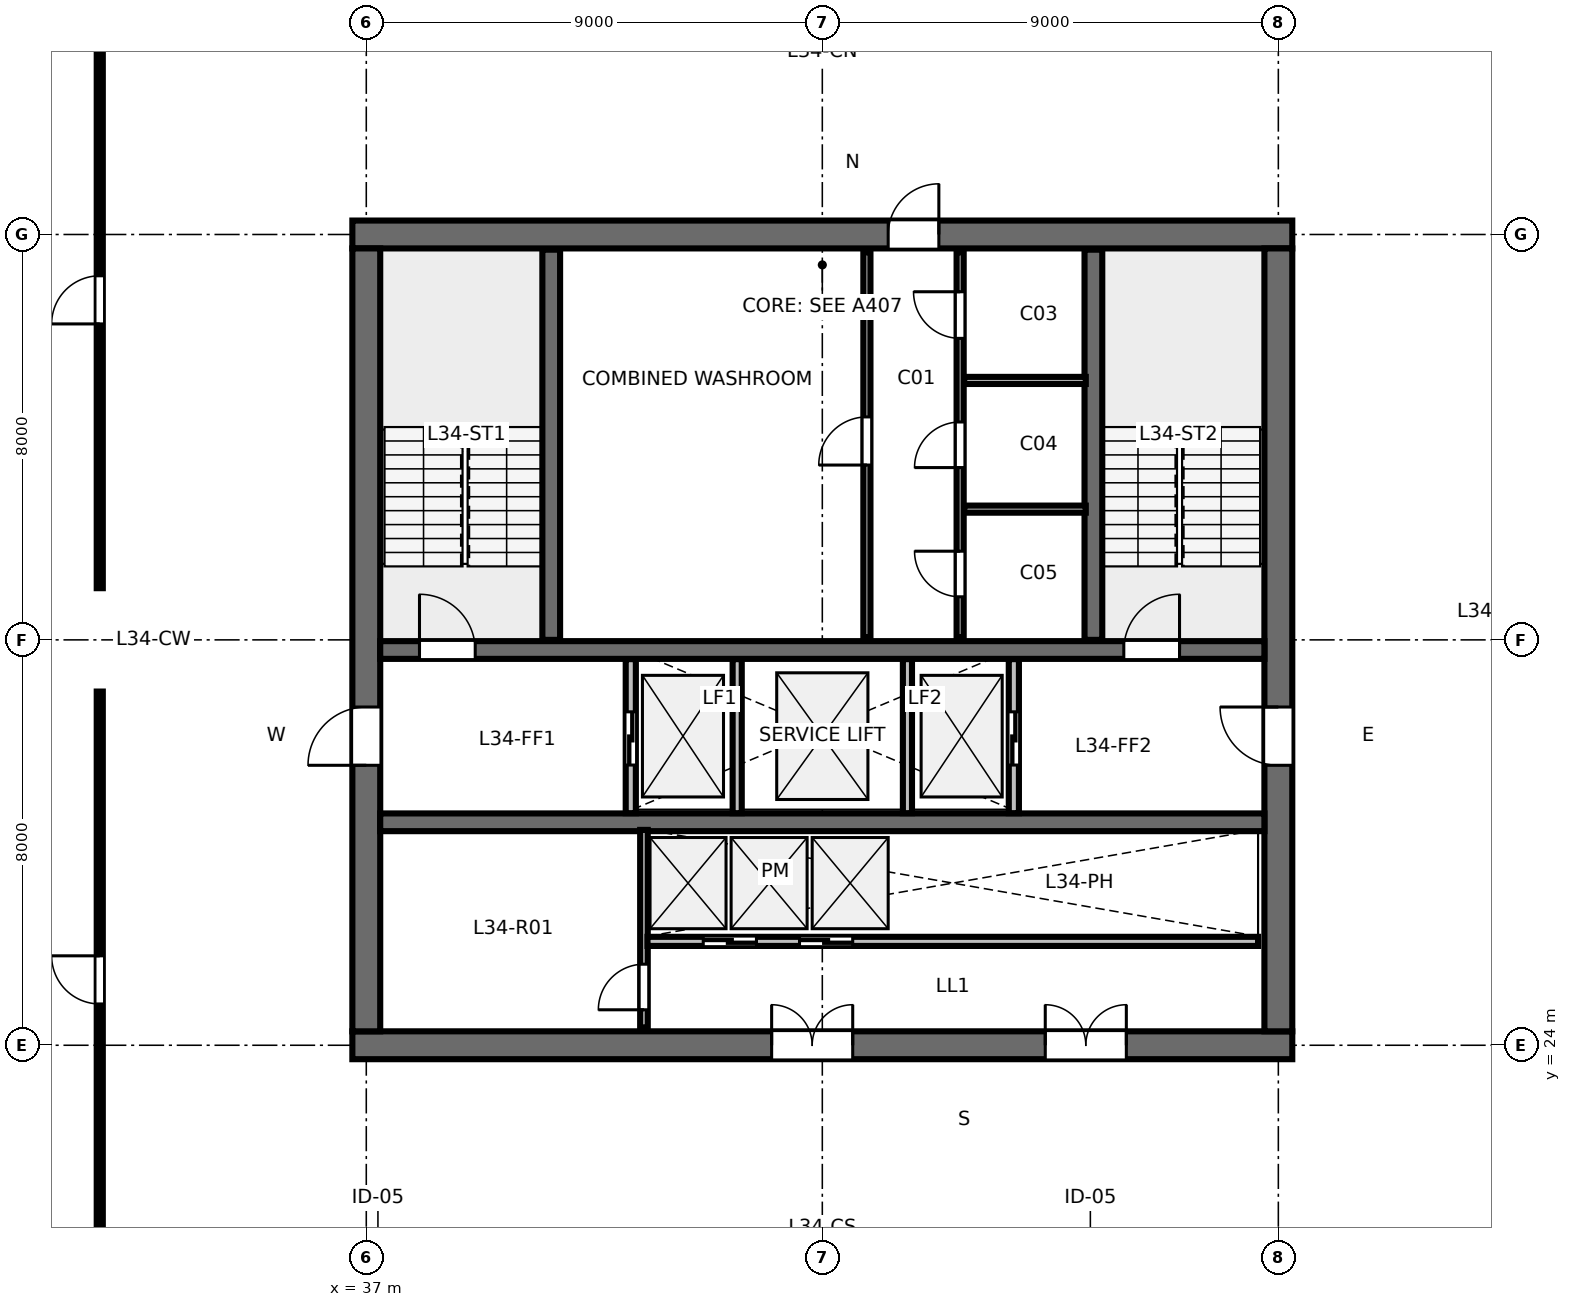
"""IFC4 building model, lengths in metres.
Left out: names, types, materials, properties, quantities, classifications, styles, units other than length and angle.
Written with IfcOpenShell. Run it as: python <this file> out.ifc"""

import sys

from ifc_helpers import new_model, si_unit, direction, frame, frame_2d, origin, place, context, subcontext, project, spatial, rectangle, extrude, element, fill, save


model = new_model("IFC4")
c1 = context("Model", 3, precision=1e-05, world=origin(), true_north=direction((0.0, 1.0)))
c2 = subcontext(c1, "Body", "Model", "MODEL_VIEW")
j1 = project(units=[si_unit("LENGTHUNIT", "METRE"), si_unit("PLANEANGLEUNIT", "RADIAN")], contexts=[c1])
p1 = place(None, origin())
s1 = spatial("IfcSite", under=j1, at=p1, CompositionType="ELEMENT")
p2 = place(p1, origin())
s2 = spatial("IfcBuilding", under=s1, at=p2, CompositionType="ELEMENT")
p3 = place(p2, frame((0.0, 0.0, 131.2)))
s3 = spatial("IfcBuildingStorey", under=s2, at=p3, CompositionType="ELEMENT", Elevation=131.2)
p4 = place(p3, frame((36.725, 24.0, 0.0), z_axis=(0.0, 0.0, 1.0), x_axis=(1.0, 0.0, 0.0)))
e1 = element("IfcWall", 1, at=p4, inside=s3, PredefinedType="SHEAR", context=c2, shape_type="SweptSolid", body=[
    extrude(rectangle(XDim=18.55, YDim=0.55, at=frame_2d((9.275, 0.0))), origin(), (0.0, 0.0, 1.0), 3.36),
])
p5 = place(p4, frame((8.275, 0.0, 0.0)))
e2 = element("IfcOpeningElement", 2, at=p5, cuts=e1, PredefinedType="OPENING", context=c2, shape_type="SweptSolid", body=[
    extrude(rectangle(XDim=1.6, YDim=2.15, at=frame_2d((0.8, 1.075))), frame((0.0, 0.285, 0.0), z_axis=(0.0, -1.0, 0.0), x_axis=(1.0, 0.0, 0.0)), (0.0, 0.0, 1.0), 0.57),
])
p6 = place(p4, frame((13.675, 0.0, 0.0)))
e3 = element("IfcOpeningElement", 3, at=p6, cuts=e1, PredefinedType="OPENING", context=c2, shape_type="SweptSolid", body=[
    extrude(rectangle(XDim=1.6, YDim=2.15, at=frame_2d((0.8, 1.075))), frame((0.0, 0.285, 0.0), z_axis=(0.0, -1.0, 0.0), x_axis=(1.0, 0.0, 0.0)), (0.0, 0.0, 1.0), 0.57),
])
p7 = place(p3, frame((36.725, 40.0, 0.0), z_axis=(0.0, 0.0, 1.0), x_axis=(1.0, 0.0, 0.0)))
e4 = element("IfcWall", 4, at=p7, inside=s3, PredefinedType="SHEAR", context=c2, shape_type="SweptSolid", body=[
    extrude(rectangle(XDim=18.55, YDim=0.55, at=frame_2d((9.275, 0.0))), origin(), (0.0, 0.0, 1.0), 3.36),
])
p8 = place(p7, frame((10.575, 0.0, 0.0)))
e5 = element("IfcOpeningElement", 5, at=p8, cuts=e4, PredefinedType="OPENING", context=c2, shape_type="SweptSolid", body=[
    extrude(rectangle(XDim=1.0, YDim=2.15, at=frame_2d((0.5, 1.075))), frame((0.0, 0.285, 0.0), z_axis=(0.0, -1.0, 0.0), x_axis=(1.0, 0.0, 0.0)), (0.0, 0.0, 1.0), 0.57),
])
p9 = place(p3, frame((37.0, 24.275, 0.0), z_axis=(0.0, 0.0, 1.0), x_axis=(0.0, 1.0, 0.0)))
e6 = element("IfcWall", 6, at=p9, inside=s3, PredefinedType="SHEAR", context=c2, shape_type="SweptSolid", body=[
    extrude(rectangle(XDim=15.45, YDim=0.55, at=frame_2d((7.725, 0.0))), origin(), (0.0, 0.0, 1.0), 3.36),
])
p10 = place(p9, frame((5.25, 0.0, 0.0)))
e7 = element("IfcOpeningElement", 7, at=p10, cuts=e6, PredefinedType="OPENING", context=c2, shape_type="SweptSolid", body=[
    extrude(rectangle(XDim=1.15, YDim=2.15, at=frame_2d((0.575, 1.075))), frame((0.0, 0.285, 0.0), z_axis=(0.0, -1.0, 0.0), x_axis=(1.0, 0.0, 0.0)), (0.0, 0.0, 1.0), 0.57),
])
p11 = place(p3, frame((55.0, 24.275, 0.0), z_axis=(0.0, 0.0, 1.0), x_axis=(0.0, 1.0, 0.0)))
e8 = element("IfcWall", 8, at=p11, inside=s3, PredefinedType="SHEAR", context=c2, shape_type="SweptSolid", body=[
    extrude(rectangle(XDim=15.45, YDim=0.55, at=frame_2d((7.725, 0.0))), origin(), (0.0, 0.0, 1.0), 3.36),
])
p12 = place(p11, frame((5.25, 0.0, 0.0)))
e9 = element("IfcOpeningElement", 9, at=p12, cuts=e8, PredefinedType="OPENING", context=c2, shape_type="SweptSolid", body=[
    extrude(rectangle(XDim=1.15, YDim=2.15, at=frame_2d((0.575, 1.075))), frame((0.0, 0.285, 0.0), z_axis=(0.0, -1.0, 0.0), x_axis=(1.0, 0.0, 0.0)), (0.0, 0.0, 1.0), 0.57),
])
p13 = place(p3, frame((37.275, 31.8, 0.0), z_axis=(0.0, 0.0, 1.0), x_axis=(1.0, 0.0, 0.0)))
e10 = element("IfcWall", 10, at=p13, inside=s3, PredefinedType="SHEAR", context=c2, shape_type="SweptSolid", body=[
    extrude(rectangle(XDim=17.45, YDim=0.35, at=frame_2d((8.725, 0.0))), origin(), (0.0, 0.0, 1.0), 3.36),
])
p14 = place(p13, frame((0.775, 0.0, 0.0)))
e11 = element("IfcOpeningElement", 11, at=p14, cuts=e10, PredefinedType="OPENING", context=c2, shape_type="SweptSolid", body=[
    extrude(rectangle(XDim=1.1, YDim=2.15, at=frame_2d((0.55, 1.075))), frame((0.0, 0.185, 0.0), z_axis=(0.0, -1.0, 0.0), x_axis=(1.0, 0.0, 0.0)), (0.0, 0.0, 1.0), 0.37),
])
p15 = place(p13, frame((14.675, 0.0, 0.0)))
e12 = element("IfcOpeningElement", 12, at=p15, cuts=e10, PredefinedType="OPENING", context=c2, shape_type="SweptSolid", body=[
    extrude(rectangle(XDim=1.1, YDim=2.15, at=frame_2d((0.55, 1.075))), frame((0.0, 0.185, 0.0), z_axis=(0.0, -1.0, 0.0), x_axis=(1.0, 0.0, 0.0)), (0.0, 0.0, 1.0), 0.37),
])
p16 = place(p3, frame((37.275, 28.4, 0.0), z_axis=(0.0, 0.0, 1.0), x_axis=(1.0, 0.0, 0.0)))
e13 = element("IfcWall", 13, at=p16, inside=s3, PredefinedType="SHEAR", context=c2, shape_type="SweptSolid", body=[
    extrude(rectangle(XDim=17.45, YDim=0.35, at=frame_2d((8.725, 0.0))), origin(), (0.0, 0.0, 1.0), 3.36),
])
for number, where, z_axis, x_axis in (
    (14, (40.65, 32.0, 0.0), (0.0, 0.0, 1.0), (0.0, 1.0, 0.0)),
    (15, (51.35, 32.0, 0.0), (0.0, 0.0, 1.0), (0.0, 1.0, 0.0)),
):
    element("IfcWall", number, at=place(p3, frame(where, z_axis=z_axis, x_axis=x_axis)), inside=s3, PredefinedType="SHEAR", context=c2, shape_type="SweptSolid", body=[
        extrude(rectangle(XDim=7.7, YDim=0.35, at=frame_2d((3.85, 0.0))), origin(), (0.0, 0.0, 1.0), 3.6),
    ])
p17 = place(p3, frame((46.88, 32.05, 0.0), z_axis=(0.0, 0.0, 1.0), x_axis=(0.0, 1.0, 0.0)))
e16 = element("IfcWall", 16, at=p17, inside=s3, PredefinedType="PARTITIONING", context=c2, shape_type="SweptSolid", body=[
    extrude(rectangle(XDim=7.6, YDim=0.14, at=frame_2d((3.8, 0.0))), origin(), (0.0, 0.0, 1.0), 3.36),
])
p18 = place(p17, frame((3.4, 0.0, 0.0)))
e17 = element("IfcOpeningElement", 17, at=p18, cuts=e16, PredefinedType="OPENING", context=c2, shape_type="SweptSolid", body=[
    extrude(rectangle(XDim=0.95, YDim=2.15, at=frame_2d((0.475, 1.075))), frame((0.0, 0.08, 0.0), z_axis=(0.0, -1.0, 0.0), x_axis=(1.0, 0.0, 0.0)), (0.0, 0.0, 1.0), 0.16),
])
p19 = place(p3, frame((48.72, 32.05, 0.0), z_axis=(0.0, 0.0, 1.0), x_axis=(0.0, 1.0, 0.0)))
e18 = element("IfcWall", 18, at=p19, inside=s3, PredefinedType="PARTITIONING", context=c2, shape_type="SweptSolid", body=[
    extrude(rectangle(XDim=7.6, YDim=0.14, at=frame_2d((3.8, 0.0))), origin(), (0.0, 0.0, 1.0), 3.36),
])
p20 = place(p19, frame((0.8, 0.0, 0.0)))
e19 = element("IfcOpeningElement", 19, at=p20, cuts=e18, PredefinedType="OPENING", context=c2, shape_type="SweptSolid", body=[
    extrude(rectangle(XDim=0.9, YDim=2.15, at=frame_2d((0.45, 1.075))), frame((0.0, 0.08, 0.0), z_axis=(0.0, -1.0, 0.0), x_axis=(1.0, 0.0, 0.0)), (0.0, 0.0, 1.0), 0.16),
])
p21 = place(p19, frame((3.35, 0.0, 0.0)))
e20 = element("IfcOpeningElement", 20, at=p21, cuts=e18, PredefinedType="OPENING", context=c2, shape_type="SweptSolid", body=[
    extrude(rectangle(XDim=0.9, YDim=2.15, at=frame_2d((0.45, 1.075))), frame((0.0, 0.08, 0.0), z_axis=(0.0, -1.0, 0.0), x_axis=(1.0, 0.0, 0.0)), (0.0, 0.0, 1.0), 0.16),
])
p22 = place(p19, frame((5.9, 0.0, 0.0)))
e21 = element("IfcOpeningElement", 21, at=p22, cuts=e18, PredefinedType="OPENING", context=c2, shape_type="SweptSolid", body=[
    extrude(rectangle(XDim=0.92, YDim=2.15, at=frame_2d((0.46, 1.075))), frame((0.0, 0.08, 0.0), z_axis=(0.0, -1.0, 0.0), x_axis=(1.0, 0.0, 0.0)), (0.0, 0.0, 1.0), 0.16),
])
for number, where, z_axis, x_axis in (
    (22, (48.8, 34.58, 0.0), (0.0, 0.0, 1.0), (1.0, 0.0, 0.0)),
    (23, (48.8, 37.12, 0.0), (0.0, 0.0, 1.0), (1.0, 0.0, 0.0)),
):
    element("IfcWall", number, at=place(p3, frame(where, z_axis=z_axis, x_axis=x_axis)), inside=s3, PredefinedType="PARTITIONING", context=c2, shape_type="SweptSolid", body=[
        extrude(rectangle(XDim=2.4, YDim=0.14, at=frame_2d((1.2, 0.0))), origin(), (0.0, 0.0, 1.0), 3.36),
    ])
p23 = place(p3, frame((42.22, 28.58, 0.0), z_axis=(0.0, 0.0, 1.0), x_axis=(0.0, 1.0, 0.0)))
e24 = element("IfcWall", 24, at=p23, inside=s3, PredefinedType="PARTITIONING", context=c2, shape_type="SweptSolid", body=[
    extrude(rectangle(XDim=3.04, YDim=0.2, at=frame_2d((1.52, 0.0))), origin(), (0.0, 0.0, 1.0), 3.36),
])
p24 = place(p23, frame((0.95, 0.0, 0.0)))
e25 = element("IfcOpeningElement", 25, at=p24, cuts=e24, PredefinedType="OPENING", context=c2, shape_type="SweptSolid", body=[
    extrude(rectangle(XDim=1.05, YDim=2.15, at=frame_2d((0.525, 1.075))), frame((0.0, 0.11, 0.0), z_axis=(0.0, -1.0, 0.0), x_axis=(1.0, 0.0, 0.0)), (0.0, 0.0, 1.0), 0.22),
])
p25 = place(p3, frame((49.78, 28.58, 0.0), z_axis=(0.0, 0.0, 1.0), x_axis=(0.0, 1.0, 0.0)))
e26 = element("IfcWall", 26, at=p25, inside=s3, PredefinedType="PARTITIONING", context=c2, shape_type="SweptSolid", body=[
    extrude(rectangle(XDim=3.04, YDim=0.2, at=frame_2d((1.52, 0.0))), origin(), (0.0, 0.0, 1.0), 3.36),
])
p26 = place(p25, frame((0.95, 0.0, 0.0)))
e27 = element("IfcOpeningElement", 27, at=p26, cuts=e26, PredefinedType="OPENING", context=c2, shape_type="SweptSolid", body=[
    extrude(rectangle(XDim=1.05, YDim=2.15, at=frame_2d((0.525, 1.075))), frame((0.0, 0.11, 0.0), z_axis=(0.0, -1.0, 0.0), x_axis=(1.0, 0.0, 0.0)), (0.0, 0.0, 1.0), 0.22),
])
for number, where, z_axis, x_axis in (
    (28, (44.32, 28.58, 0.0), (0.0, 0.0, 1.0), (0.0, 1.0, 0.0)),
    (29, (47.68, 28.58, 0.0), (0.0, 0.0, 1.0), (0.0, 1.0, 0.0)),
):
    element("IfcWall", number, at=place(p3, frame(where, z_axis=z_axis, x_axis=x_axis)), inside=s3, PredefinedType="PARTITIONING", context=c2, shape_type="SweptSolid", body=[
        extrude(rectangle(XDim=3.04, YDim=0.18, at=frame_2d((1.52, 0.0))), origin(), (0.0, 0.0, 1.0), 3.36),
    ])
p27 = place(p3, frame((42.48, 24.35, 0.0), z_axis=(0.0, 0.0, 1.0), x_axis=(0.0, 1.0, 0.0)))
e30 = element("IfcWall", 30, at=p27, inside=s3, PredefinedType="PARTITIONING", context=c2, shape_type="SweptSolid", body=[
    extrude(rectangle(XDim=3.9, YDim=0.15, at=frame_2d((1.95, 0.0))), origin(), (0.0, 0.0, 1.0), 3.36),
])
p28 = place(p27, frame((0.35, 0.0, 0.0)))
e31 = element("IfcOpeningElement", 31, at=p28, cuts=e30, PredefinedType="OPENING", context=c2, shape_type="SweptSolid", body=[
    extrude(rectangle(XDim=0.9, YDim=2.15, at=frame_2d((0.45, 1.075))), frame((0.0, 0.085, 0.0), z_axis=(0.0, -1.0, 0.0), x_axis=(1.0, 0.0, 0.0)), (0.0, 0.0, 1.0), 0.17),
])
p29 = place(p3, frame((42.55, 26.05, 0.0), z_axis=(0.0, 0.0, 1.0), x_axis=(1.0, 0.0, 0.0)))
e32 = element("IfcWall", 32, at=p29, inside=s3, PredefinedType="PARTITIONING", context=c2, shape_type="SweptSolid", body=[
    extrude(rectangle(XDim=12.05, YDim=0.18, at=frame_2d((6.025, 0.0))), origin(), (0.0, 0.0, 1.0), 3.36),
])
p30 = place(p29, frame((1.1, 0.0, 0.0)))
e33 = element("IfcOpeningElement", 33, at=p30, cuts=e32, PredefinedType="OPENING", context=c2, shape_type="SweptSolid", body=[
    extrude(rectangle(XDim=1.05, YDim=2.15, at=frame_2d((0.525, 1.075))), frame((0.0, 0.1, 0.0), z_axis=(0.0, -1.0, 0.0), x_axis=(1.0, 0.0, 0.0)), (0.0, 0.0, 1.0), 0.2),
])
p31 = place(p29, frame((3.0, 0.0, 0.0)))
e34 = element("IfcOpeningElement", 34, at=p31, cuts=e32, PredefinedType="OPENING", context=c2, shape_type="SweptSolid", body=[
    extrude(rectangle(XDim=1.05, YDim=2.15, at=frame_2d((0.525, 1.075))), frame((0.0, 0.1, 0.0), z_axis=(0.0, -1.0, 0.0), x_axis=(1.0, 0.0, 0.0)), (0.0, 0.0, 1.0), 0.2),
])
p32 = place(p3, frame((31.74, 19.4, 0.0), z_axis=(0.0, 0.0, 1.0), x_axis=(0.0, 1.0, 0.0)))
e35 = element("IfcWall", 35, at=p32, inside=s3, PredefinedType="PARTITIONING", context=c2, shape_type="SweptSolid", body=[
    extrude(rectangle(XDim=11.58, YDim=0.12, at=frame_2d((5.79, 0.0))), origin(), (0.0, 0.0, 1.0), 2.64),
])
p33 = place(p32, frame((5.415, 0.0, 0.0)))
e36 = element("IfcOpeningElement", 36, at=p33, cuts=e35, PredefinedType="OPENING", context=c2, shape_type="SweptSolid", body=[
    extrude(rectangle(XDim=0.95, YDim=2.15, at=frame_2d((0.475, 1.075))), frame((0.0, 0.07, 0.0), z_axis=(0.0, -1.0, 0.0), x_axis=(1.0, 0.0, 0.0)), (0.0, 0.0, 1.0), 0.14),
])
p34 = place(p3, frame((31.74, 33.02, 0.0), z_axis=(0.0, 0.0, 1.0), x_axis=(0.0, 1.0, 0.0)))
e37 = element("IfcWall", 37, at=p34, inside=s3, PredefinedType="PARTITIONING", context=c2, shape_type="SweptSolid", body=[
    extrude(rectangle(XDim=11.58, YDim=0.12, at=frame_2d((5.79, 0.0))), origin(), (0.0, 0.0, 1.0), 2.64),
])
p35 = place(p34, frame((5.215, 0.0, 0.0)))
e38 = element("IfcOpeningElement", 38, at=p35, cuts=e37, PredefinedType="OPENING", context=c2, shape_type="SweptSolid", body=[
    extrude(rectangle(XDim=0.95, YDim=2.15, at=frame_2d((0.475, 1.075))), frame((0.0, 0.07, 0.0), z_axis=(0.0, -1.0, 0.0), x_axis=(1.0, 0.0, 0.0)), (0.0, 0.0, 1.0), 0.14),
])
p36 = place(p14, origin())
e39 = element("IfcDoor", 39, at=p36, inside=s3, OperationType="SINGLE_SWING_LEFT", PredefinedType="DOOR", context=c2, shape_type="SweptSolid", body=[
    extrude(rectangle(XDim=1.1, YDim=2.15, at=frame_2d((0.55, 1.075))), frame((0.0, 0.025, 0.0), z_axis=(0.0, -1.0, 0.0), x_axis=(1.0, 0.0, 0.0)), (0.0, 0.0, 1.0), 0.05),
])
fill(e11, e39)
p37 = place(p15, origin())
e40 = element("IfcDoor", 40, at=p37, inside=s3, OperationType="SINGLE_SWING_RIGHT", PredefinedType="DOOR", context=c2, shape_type="SweptSolid", body=[
    extrude(rectangle(XDim=1.1, YDim=2.15, at=frame_2d((0.55, 1.075))), frame((0.0, 0.025, 0.0), z_axis=(0.0, -1.0, 0.0), x_axis=(1.0, 0.0, 0.0)), (0.0, 0.0, 1.0), 0.05),
])
fill(e12, e40)
p38 = place(p8, origin())
e41 = element("IfcDoor", 41, at=p38, inside=s3, OperationType="SINGLE_SWING_RIGHT", PredefinedType="DOOR", context=c2, shape_type="SweptSolid", body=[
    extrude(rectangle(XDim=1.0, YDim=2.15, at=frame_2d((0.5, 1.075))), frame((0.0, 0.025, 0.0), z_axis=(0.0, -1.0, 0.0), x_axis=(1.0, 0.0, 0.0)), (0.0, 0.0, 1.0), 0.05),
])
fill(e5, e41)
p39 = place(p10, origin())
e42 = element("IfcDoor", 42, at=p39, inside=s3, OperationType="SINGLE_SWING_LEFT", PredefinedType="DOOR", context=c2, shape_type="SweptSolid", body=[
    extrude(rectangle(XDim=1.15, YDim=2.15, at=frame_2d((0.575, 1.075))), frame((0.0, 0.025, 0.0), z_axis=(0.0, -1.0, 0.0), x_axis=(1.0, 0.0, 0.0)), (0.0, 0.0, 1.0), 0.05),
])
fill(e7, e42)
p40 = place(p12, origin())
e43 = element("IfcDoor", 43, at=p40, inside=s3, OperationType="SINGLE_SWING_RIGHT", PredefinedType="DOOR", context=c2, shape_type="SweptSolid", body=[
    extrude(rectangle(XDim=1.15, YDim=2.15, at=frame_2d((0.575, 1.075))), frame((0.0, 0.025, 0.0), z_axis=(0.0, -1.0, 0.0), x_axis=(1.0, 0.0, 0.0)), (0.0, 0.0, 1.0), 0.05),
])
fill(e9, e43)
p41 = place(p5, origin())
e44 = element("IfcDoor", 44, at=p41, inside=s3, OperationType="DOUBLE_DOOR_SINGLE_SWING", PredefinedType="DOOR", context=c2, shape_type="SweptSolid", body=[
    extrude(rectangle(XDim=1.6, YDim=2.15, at=frame_2d((0.8, 1.075))), frame((0.0, 0.025, 0.0), z_axis=(0.0, -1.0, 0.0), x_axis=(1.0, 0.0, 0.0)), (0.0, 0.0, 1.0), 0.05),
])
fill(e2, e44)
p42 = place(p6, origin())
e45 = element("IfcDoor", 45, at=p42, inside=s3, OperationType="DOUBLE_DOOR_SINGLE_SWING", PredefinedType="DOOR", context=c2, shape_type="SweptSolid", body=[
    extrude(rectangle(XDim=1.6, YDim=2.15, at=frame_2d((0.8, 1.075))), frame((0.0, 0.025, 0.0), z_axis=(0.0, -1.0, 0.0), x_axis=(1.0, 0.0, 0.0)), (0.0, 0.0, 1.0), 0.05),
])
fill(e3, e45)
p43 = place(p18, origin())
e46 = element("IfcDoor", 46, at=p43, inside=s3, OperationType="SINGLE_SWING_LEFT", PredefinedType="DOOR", context=c2, shape_type="SweptSolid", body=[
    extrude(rectangle(XDim=0.95, YDim=2.15, at=frame_2d((0.475, 1.075))), frame((0.0, 0.025, 0.0), z_axis=(0.0, -1.0, 0.0), x_axis=(1.0, 0.0, 0.0)), (0.0, 0.0, 1.0), 0.05),
])
fill(e17, e46)
p44 = place(p20, origin())
e47 = element("IfcDoor", 47, at=p44, inside=s3, OperationType="SINGLE_SWING_RIGHT", PredefinedType="DOOR", context=c2, shape_type="SweptSolid", body=[
    extrude(rectangle(XDim=0.9, YDim=2.15, at=frame_2d((0.45, 1.075))), frame((0.0, 0.025, 0.0), z_axis=(0.0, -1.0, 0.0), x_axis=(1.0, 0.0, 0.0)), (0.0, 0.0, 1.0), 0.05),
])
fill(e19, e47)
p45 = place(p21, origin())
e48 = element("IfcDoor", 48, at=p45, inside=s3, OperationType="SINGLE_SWING_LEFT", PredefinedType="DOOR", context=c2, shape_type="SweptSolid", body=[
    extrude(rectangle(XDim=0.9, YDim=2.15, at=frame_2d((0.45, 1.075))), frame((0.0, 0.025, 0.0), z_axis=(0.0, -1.0, 0.0), x_axis=(1.0, 0.0, 0.0)), (0.0, 0.0, 1.0), 0.05),
])
fill(e20, e48)
p46 = place(p22, origin())
e49 = element("IfcDoor", 49, at=p46, inside=s3, OperationType="SINGLE_SWING_RIGHT", PredefinedType="DOOR", context=c2, shape_type="SweptSolid", body=[
    extrude(rectangle(XDim=0.92, YDim=2.15, at=frame_2d((0.46, 1.075))), frame((0.0, 0.025, 0.0), z_axis=(0.0, -1.0, 0.0), x_axis=(1.0, 0.0, 0.0)), (0.0, 0.0, 1.0), 0.05),
])
fill(e21, e49)
p47 = place(p24, origin())
e50 = element("IfcDoor", 50, at=p47, inside=s3, OperationType="SLIDING_TO_LEFT", PredefinedType="DOOR", context=c2, shape_type="SweptSolid", body=[
    extrude(rectangle(XDim=1.05, YDim=2.15, at=frame_2d((0.525, 1.075))), frame((0.0, 0.025, 0.0), z_axis=(0.0, -1.0, 0.0), x_axis=(1.0, 0.0, 0.0)), (0.0, 0.0, 1.0), 0.05),
])
fill(e25, e50)
p48 = place(p26, origin())
e51 = element("IfcDoor", 51, at=p48, inside=s3, OperationType="SLIDING_TO_RIGHT", PredefinedType="DOOR", context=c2, shape_type="SweptSolid", body=[
    extrude(rectangle(XDim=1.05, YDim=2.15, at=frame_2d((0.525, 1.075))), frame((0.0, 0.025, 0.0), z_axis=(0.0, -1.0, 0.0), x_axis=(1.0, 0.0, 0.0)), (0.0, 0.0, 1.0), 0.05),
])
fill(e27, e51)
p49 = place(p28, origin())
e52 = element("IfcDoor", 52, at=p49, inside=s3, OperationType="SINGLE_SWING_LEFT", PredefinedType="DOOR", context=c2, shape_type="SweptSolid", body=[
    extrude(rectangle(XDim=0.9, YDim=2.15, at=frame_2d((0.45, 1.075))), frame((0.0, 0.025, 0.0), z_axis=(0.0, -1.0, 0.0), x_axis=(1.0, 0.0, 0.0)), (0.0, 0.0, 1.0), 0.05),
])
fill(e31, e52)
p50 = place(p30, origin())
e53 = element("IfcDoor", 53, at=p50, inside=s3, OperationType="SLIDING_TO_LEFT", PredefinedType="DOOR", context=c2, shape_type="SweptSolid", body=[
    extrude(rectangle(XDim=1.05, YDim=2.15, at=frame_2d((0.525, 1.075))), frame((0.0, 0.025, 0.0), z_axis=(0.0, -1.0, 0.0), x_axis=(1.0, 0.0, 0.0)), (0.0, 0.0, 1.0), 0.05),
])
fill(e33, e53)
p51 = place(p31, origin())
e54 = element("IfcDoor", 54, at=p51, inside=s3, OperationType="SLIDING_TO_RIGHT", PredefinedType="DOOR", context=c2, shape_type="SweptSolid", body=[
    extrude(rectangle(XDim=1.05, YDim=2.15, at=frame_2d((0.525, 1.075))), frame((0.0, 0.025, 0.0), z_axis=(0.0, -1.0, 0.0), x_axis=(1.0, 0.0, 0.0)), (0.0, 0.0, 1.0), 0.05),
])
fill(e34, e54)
p52 = place(p33, origin())
e55 = element("IfcDoor", 55, at=p52, inside=s3, OperationType="SINGLE_SWING_RIGHT", PredefinedType="DOOR", context=c2, shape_type="SweptSolid", body=[
    extrude(rectangle(XDim=0.95, YDim=2.15, at=frame_2d((0.475, 1.075))), frame((0.0, 0.025, 0.0), z_axis=(0.0, -1.0, 0.0), x_axis=(1.0, 0.0, 0.0)), (0.0, 0.0, 1.0), 0.05),
])
fill(e36, e55)
p53 = place(p35, origin())
e56 = element("IfcDoor", 56, at=p53, inside=s3, OperationType="SINGLE_SWING_LEFT", PredefinedType="DOOR", context=c2, shape_type="SweptSolid", body=[
    extrude(rectangle(XDim=0.95, YDim=2.15, at=frame_2d((0.475, 1.075))), frame((0.0, 0.025, 0.0), z_axis=(0.0, -1.0, 0.0), x_axis=(1.0, 0.0, 0.0)), (0.0, 0.0, 1.0), 0.05),
])
fill(e38, e56)
save(model, sys.argv[1])
